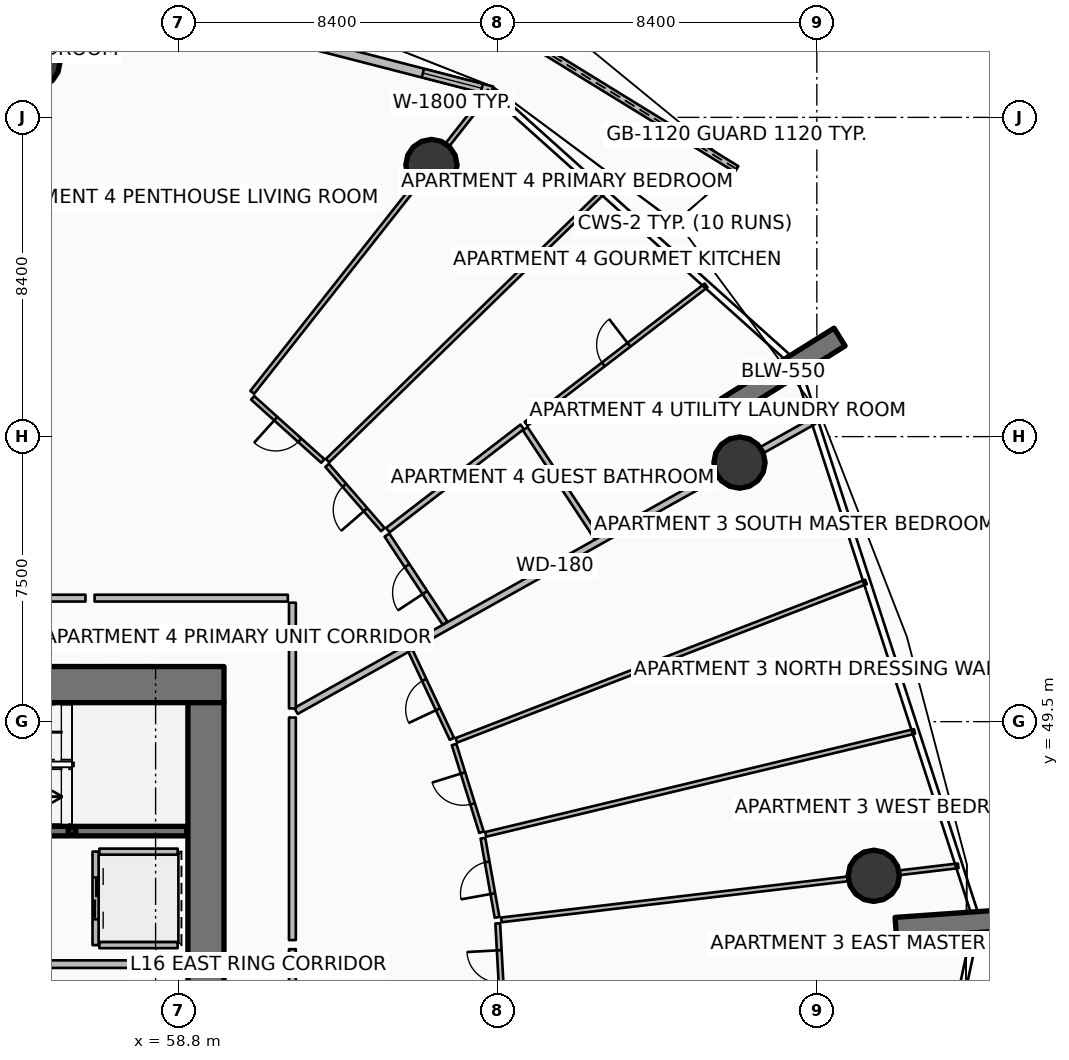
"""IFC4 building model, lengths in metres.
Left out: names, types, materials, properties, quantities, classifications, styles, units other than length and angle.
Written with IfcOpenShell. Run it as: python <this file> out.ifc"""

import sys

from ifc_helpers import new_model, si_unit, direction, frame, frame_2d, origin, origin_2d, place, context, subcontext, project, spatial, polyline, rectangle, hollow_rectangle, circle, outline, extrude, element, fill, save


model = new_model("IFC4")
c1 = context("Model", 3, precision=1e-05, world=origin(), true_north=direction((0.0, 1.0)))
c2 = subcontext(c1, "Body", "Model", "MODEL_VIEW")
j1 = project(units=[si_unit("LENGTHUNIT", "METRE"), si_unit("PLANEANGLEUNIT", "RADIAN")], contexts=[c1])
p1 = place(None, origin())
s1 = spatial("IfcSite", under=j1, at=p1, CompositionType="ELEMENT")
p2 = place(p1, origin())
s2 = spatial("IfcBuilding", under=s1, at=p2, CompositionType="ELEMENT")
p3 = place(p2, frame((0.0, 0.0, 67.65)))
s3 = spatial("IfcBuildingStorey", under=s2, at=p3, CompositionType="ELEMENT", Elevation=67.65)
p4 = place(p3, frame((49.95, 50.475, 0.0), z_axis=(0.0, 0.0, 1.0), x_axis=(1.0, 0.0, 0.0)))
e1 = element("IfcWall", 1, at=p4, inside=s3, PredefinedType="SHEAR", context=c2, shape_type="SweptSolid", body=[
    extrude(rectangle(XDim=10.05, YDim=0.95, at=frame_2d((5.025, 0.0))), origin(), (0.0, 0.0, 1.0), 3.75),
])
p5 = place(p3, frame((59.525, 34.0, 0.0), z_axis=(0.0, 0.0, 1.0), x_axis=(0.0, 1.0, 0.0)))
e2 = element("IfcWall", 2, at=p5, inside=s3, PredefinedType="SHEAR", context=c2, shape_type="SweptSolid", body=[
    extrude(rectangle(XDim=16.0, YDim=0.95, at=frame_2d((8.0, 0.0))), origin(), (0.0, 0.0, 1.0), 3.75),
])
p6 = place(p3, frame((56.0, 46.62, 0.0), z_axis=(0.0, 0.0, 1.0), x_axis=(1.0, 0.0, 0.0)))
e3 = element("IfcColumn", 3, at=p6, inside=s3, PredefinedType="COLUMN", context=c2, shape_type="SweptSolid", body=[
    extrude(hollow_rectangle(XDim=0.2, YDim=0.2, WallThickness=0.01, InnerFilletRadius=0.01, OuterFilletRadius=0.02, at=origin_2d()), origin(), (0.0, 0.0, 1.0), 1.67),
])
for number, where, z_axis, x_axis in (
    (4, (73.23, 57.765, 0.0), (0.0, 0.0, 1.0), (0.848, 0.53, 0.0)),
    (5, (77.678, 44.075, 0.0), (0.0, 0.0, 1.0), (0.998, 0.07, 0.0)),
):
    element("IfcWall", number, at=place(p3, frame(where, z_axis=z_axis, x_axis=x_axis)), inside=s3, PredefinedType="SOLIDWALL", context=c2, shape_type="SweptSolid", body=[
        extrude(rectangle(XDim=3.5, YDim=0.55, at=frame_2d((1.75, 0.0))), origin(), (0.0, 0.0, 1.0), 3.75),
    ])
for number, where, z_axis, x_axis in (
    (6, (73.565, 56.317, 0.0), (0.0, 0.0, 1.0), (1.0, 0.0, 0.0)),
    (7, (65.458, 64.146, 0.0), (0.0, 0.0, 1.0), (1.0, 0.0, 0.0)),
    (8, (55.008, 66.849, 0.0), (0.0, 0.0, 1.0), (1.0, 0.0, 0.0)),
    (9, (77.098, 45.444, 0.0), (0.0, 0.0, 1.0), (1.0, 0.0, 0.0)),
):
    element("IfcColumn", number, at=place(p3, frame(where, z_axis=z_axis, x_axis=x_axis)), inside=s3, PredefinedType="COLUMN", context=c2, shape_type="SweptSolid", body=[
        extrude(circle(Radius=0.675, at=origin_2d()), origin(), (0.0, 0.0, 1.0), 3.35),
    ])
p7 = place(p3, frame((73.488, 64.039, 0.0), z_axis=(0.0, 0.0, 1.0), x_axis=(-0.851732671453, 0.523976579991, 0.0)))
e10 = element("IfcWall", 10, at=p7, inside=s3, PredefinedType="PARAPET", context=c2, shape_type="SweptSolid", body=[
    extrude(outline(polyline([(0.0, 0.0), (12.625, 0.0), (12.625, 1.832), (6.312, 1.696), (0.0, 1.497), (0.0, 0.0)])), frame((0.0, 0.09, 0.0), z_axis=(0.0, -1.0, 0.0), x_axis=(1.0, 0.0, 0.0)), (0.0, 0.0, 1.0), 0.18),
])
p8 = place(p3, frame((67.054, 66.096, 0.0), z_axis=(0.0, 0.0, 1.0), x_axis=(-0.96833871487, 0.249640007378, 0.0)))
e11 = element("IfcWall", 11, at=p8, inside=s3, PredefinedType="SOLIDWALL", context=c2, shape_type="SweptSolid", body=[
    extrude(rectangle(XDim=11.851, YDim=0.24, at=frame_2d((5.926, 0.0))), origin(), (0.0, 0.0, 1.0), 2.3),
])
p9 = place(p8, frame((9.631, 0.0, 0.0)))
e12 = element("IfcOpeningElement", 12, at=p9, cuts=e11, PredefinedType="OPENING", context=c2, shape_type="SweptSolid", body=[
    extrude(rectangle(XDim=1.45, YDim=2.15, at=frame_2d((0.725, 1.075))), frame((0.0, 0.13, 0.0), z_axis=(0.0, -1.0, 0.0), x_axis=(1.0, 0.0, 0.0)), (0.0, 0.0, 1.0), 0.26),
])
p10 = place(p8, frame((0.28, 0.0, 0.65)))
e13 = element("IfcOpeningElement", 13, at=p10, cuts=e11, PredefinedType="OPENING", context=c2, shape_type="SweptSolid", body=[
    extrude(rectangle(XDim=1.6, YDim=1.5, at=frame_2d((0.8, 0.75))), frame((0.0, 0.13, 0.0), z_axis=(0.0, -1.0, 0.0), x_axis=(1.0, 0.0, 0.0)), (0.0, 0.0, 1.0), 0.26),
])
p11 = place(p3, frame((51.48, 46.62, 0.0), z_axis=(0.0, 0.0, 1.0), x_axis=(1.0, 0.0, 0.0)))
e14 = element("IfcWall", 14, at=p11, inside=s3, PredefinedType="SOLIDWALL", context=c2, shape_type="SweptSolid", body=[
    extrude(rectangle(XDim=7.54, YDim=0.25, at=frame_2d((3.77, 0.0))), origin(), (0.0, 0.0, 1.0), 3.35),
])
p12 = place(p11, frame((0.3, 0.0, 0.0)))
e15 = element("IfcOpeningElement", 15, at=p12, cuts=e14, PredefinedType="OPENING", context=c2, shape_type="SweptSolid", body=[
    extrude(rectangle(XDim=1.55, YDim=2.15, at=frame_2d((0.775, 1.075))), frame((0.0, 0.135, 0.0), z_axis=(0.0, -1.0, 0.0), x_axis=(1.0, 0.0, 0.0)), (0.0, 0.0, 1.0), 0.27),
])
p13 = place(p3, frame((56.62, 46.08, 0.0), z_axis=(0.0, 0.0, 1.0), x_axis=(0.0, -1.0, 0.0)))
e16 = element("IfcWall", 16, at=p13, inside=s3, PredefinedType="PARTITIONING", context=c2, shape_type="SweptSolid", body=[
    extrude(rectangle(XDim=2.46, YDim=0.16, at=frame_2d((1.23, 0.0))), origin(), (0.0, 0.0, 1.0), 3.35),
])
p14 = place(p13, frame((0.68, 0.0, 0.0)))
e17 = element("IfcOpeningElement", 17, at=p14, cuts=e16, PredefinedType="OPENING", context=c2, shape_type="SweptSolid", body=[
    extrude(rectangle(XDim=1.1, YDim=2.1, at=frame_2d((0.55, 1.05))), frame((0.0, 0.09, 0.0), z_axis=(0.0, -1.0, 0.0), x_axis=(1.0, 0.0, 0.0)), (0.0, 0.0, 1.0), 0.18),
])
for number, where, z_axis, x_axis in (
    (18, (56.72, 46.08, 0.0), (0.0, 0.0, 1.0), (1.0, 0.0, 0.0)),
    (19, (56.72, 43.62, 0.0), (0.0, 0.0, 1.0), (1.0, 0.0, 0.0)),
):
    element("IfcWall", number, at=place(p3, frame(where, z_axis=z_axis, x_axis=x_axis)), inside=s3, PredefinedType="PARTITIONING", context=c2, shape_type="SweptSolid", body=[
        extrude(rectangle(XDim=2.06, YDim=0.16, at=frame_2d((1.03, 0.0))), origin(), (0.0, 0.0, 1.0), 3.35),
    ])
p15 = place(p3, frame((50.12, 43.12, 0.0), z_axis=(0.0, 0.0, 1.0), x_axis=(1.0, 0.0, 0.0)))
e20 = element("IfcWall", 20, at=p15, inside=s3, PredefinedType="PARTITIONING", context=c2, shape_type="SweptSolid", body=[
    extrude(rectangle(XDim=8.88, YDim=0.2, at=frame_2d((4.44, 0.0))), origin(), (0.0, 0.0, 1.0), 3.35),
])
p16 = place(p3, frame((61.896, 49.782, 0.0), z_axis=(0.0, 0.0, 1.0), x_axis=(0.872493215695, 0.488626225828, 0.0)))
e21 = element("IfcWall", 21, at=p16, inside=s3, PredefinedType="PARTITIONING", context=c2, shape_type="SweptSolid", body=[
    extrude(rectangle(XDim=15.612, YDim=0.18, at=frame_2d((7.806, 0.0))), origin(), (0.0, 0.0, 1.0), 2.717),
])
p17 = place(p3, frame((61.8, 38.228, 0.0), z_axis=(0.0, 0.0, 1.0), x_axis=(0.0, 1.0, 0.0)))
e22 = element("IfcWall", 22, at=p17, inside=s3, PredefinedType="PARTITIONING", context=c2, shape_type="SweptSolid", body=[
    extrude(rectangle(XDim=5.285, YDim=0.18, at=frame_2d((2.643, 0.0))), origin(), (0.0, 0.0, 1.0), 2.717),
])
p18 = place(p3, frame((67.328, 41.928, 0.0), z_axis=(0.0, 0.0, 1.0), x_axis=(-0.054903584575, 0.998491660657, 0.0)))
e23 = element("IfcWall", 23, at=p18, inside=s3, PredefinedType="PARTITIONING", context=c2, shape_type="SweptSolid", body=[
    extrude(rectangle(XDim=2.268, YDim=0.125, at=frame_2d((1.134, 0.0))), origin(), (0.0, 0.0, 1.0), 2.717),
])
p19 = place(p18, frame((0.709, 0.0, 0.0)))
e24 = element("IfcOpeningElement", 24, at=p19, cuts=e23, PredefinedType="OPENING", context=c2, shape_type="SweptSolid", body=[
    extrude(rectangle(XDim=0.85, YDim=2.06, at=frame_2d((0.425, 1.03))), frame((0.0, 0.073, 0.0), z_axis=(0.0, -1.0, 0.0), x_axis=(1.0, 0.0, 0.0)), (0.0, 0.0, 1.0), 0.145),
])
p20 = place(p3, frame((61.8, 43.753, 0.0), z_axis=(0.0, 0.0, 1.0), x_axis=(0.0, 1.0, 0.0)))
e25 = element("IfcWall", 25, at=p20, inside=s3, PredefinedType="PARTITIONING", context=c2, shape_type="SweptSolid", body=[
    extrude(rectangle(XDim=5.855, YDim=0.18, at=frame_2d((2.927, 0.0))), origin(), (0.0, 0.0, 1.0), 2.717),
])
p21 = place(p3, frame((67.298, 44.284, 0.0), z_axis=(0.0, 0.0, 1.0), x_axis=(0.993068589749, 0.117536275483, 0.0)))
e26 = element("IfcWall", 26, at=p21, inside=s3, PredefinedType="PARTITIONING", context=c2, shape_type="SweptSolid", body=[
    extrude(rectangle(XDim=12.106, YDim=0.125, at=frame_2d((6.053, 0.0))), origin(), (0.0, 0.0, 1.0), 2.717),
])
p22 = place(p3, frame((66.886, 46.534, 0.0), z_axis=(0.0, 0.0, 1.0), x_axis=(0.972368393799, 0.233451722507, 0.0)))
e27 = element("IfcWall", 27, at=p22, inside=s3, PredefinedType="PARTITIONING", context=c2, shape_type="SweptSolid", body=[
    extrude(rectangle(XDim=11.605, YDim=0.125, at=frame_2d((5.802, 0.0))), origin(), (0.0, 0.0, 1.0), 2.79),
])
p23 = place(p3, frame((66.115, 49.008, 0.0), z_axis=(0.0, 0.0, 1.0), x_axis=(0.932641955578, 0.360803246514, 0.0)))
e28 = element("IfcWall", 28, at=p23, inside=s3, PredefinedType="PARTITIONING", context=c2, shape_type="SweptSolid", body=[
    extrude(rectangle(XDim=11.556, YDim=0.125, at=frame_2d((5.778, 0.0))), origin(), (0.0, 0.0, 1.0), 2.79),
])
p24 = place(p3, frame((67.185, 44.351, 0.0), z_axis=(0.0, 0.0, 1.0), x_axis=(-0.175726743029, 0.984438983271, 0.0)))
e29 = element("IfcWall", 29, at=p24, inside=s3, PredefinedType="PARTITIONING", context=c2, shape_type="SweptSolid", body=[
    extrude(rectangle(XDim=2.116, YDim=0.125, at=frame_2d((1.058, 0.0))), origin(), (0.0, 0.0, 1.0), 2.717),
])
p25 = place(p24, frame((0.633, 0.0, 0.0)))
e30 = element("IfcOpeningElement", 30, at=p25, cuts=e29, PredefinedType="OPENING", context=c2, shape_type="SweptSolid", body=[
    extrude(rectangle(XDim=0.85, YDim=2.06, at=frame_2d((0.425, 1.03))), frame((0.0, 0.073, 0.0), z_axis=(0.0, -1.0, 0.0), x_axis=(1.0, 0.0, 0.0)), (0.0, 0.0, 1.0), 0.145),
])
p26 = place(p3, frame((66.775, 46.59, 0.0), z_axis=(0.0, 0.0, 1.0), x_axis=(-0.297792299564, 0.954630685826, 0.0)))
e31 = element("IfcWall", 31, at=p26, inside=s3, PredefinedType="PARTITIONING", context=c2, shape_type="SweptSolid", body=[
    extrude(rectangle(XDim=2.419, YDim=0.125, at=frame_2d((1.21, 0.0))), origin(), (0.0, 0.0, 1.0), 2.79),
])
p27 = place(p26, frame((0.785, 0.0, 0.0)))
e32 = element("IfcOpeningElement", 32, at=p27, cuts=e31, PredefinedType="OPENING", context=c2, shape_type="SweptSolid", body=[
    extrude(rectangle(XDim=0.85, YDim=2.06, at=frame_2d((0.425, 1.03))), frame((0.0, 0.073, 0.0), z_axis=(0.0, -1.0, 0.0), x_axis=(1.0, 0.0, 0.0)), (0.0, 0.0, 1.0), 0.145),
])
p28 = place(p3, frame((65.997, 49.048, 0.0), z_axis=(0.0, 0.0, 1.0), x_axis=(-0.425774166793, 0.904829463983, 0.0)))
e33 = element("IfcWall", 33, at=p28, inside=s3, PredefinedType="PARTITIONING", context=c2, shape_type="SweptSolid", body=[
    extrude(rectangle(XDim=2.571, YDim=0.125, at=frame_2d((1.285, 0.0))), origin(), (0.0, 0.0, 1.0), 2.717),
])
p29 = place(p28, frame((0.86, 0.0, 0.0)))
e34 = element("IfcOpeningElement", 34, at=p29, cuts=e33, PredefinedType="OPENING", context=c2, shape_type="SweptSolid", body=[
    extrude(rectangle(XDim=0.85, YDim=2.06, at=frame_2d((0.425, 1.03))), frame((0.0, 0.073, 0.0), z_axis=(0.0, -1.0, 0.0), x_axis=(1.0, 0.0, 0.0)), (0.0, 0.0, 1.0), 0.145),
])
p30 = place(p3, frame((56.354, 52.75, 0.0), z_axis=(0.0, 0.0, 1.0), x_axis=(-1.0, 0.0, 0.0)))
e35 = element("IfcWall", 35, at=p30, inside=s3, PredefinedType="PARTITIONING", context=c2, shape_type="SweptSolid", body=[
    extrude(rectangle(XDim=5.203, YDim=0.18, at=frame_2d((2.601, 0.0))), origin(), (0.0, 0.0, 1.0), 2.717),
])
p31 = place(p30, frame((2.052, 0.0, 0.0)))
e36 = element("IfcOpeningElement", 36, at=p31, cuts=e35, PredefinedType="OPENING", context=c2, shape_type="SweptSolid", body=[
    extrude(rectangle(XDim=1.1, YDim=2.1, at=frame_2d((0.55, 1.05))), frame((0.0, 0.1, 0.0), z_axis=(0.0, -1.0, 0.0), x_axis=(1.0, 0.0, 0.0)), (0.0, 0.0, 1.0), 0.2),
])
p32 = place(p3, frame((61.8, 49.848, 0.0), z_axis=(0.0, 0.0, 1.0), x_axis=(0.0, 1.0, 0.0)))
e37 = element("IfcWall", 37, at=p32, inside=s3, PredefinedType="PARTITIONING", context=c2, shape_type="SweptSolid", body=[
    extrude(rectangle(XDim=2.781, YDim=0.18, at=frame_2d((1.391, 0.0))), origin(), (0.0, 0.0, 1.0), 2.717),
])
p33 = place(p3, frame((61.68, 52.75, 0.0), z_axis=(0.0, 0.0, 1.0), x_axis=(-1.0, 0.0, 0.0)))
e38 = element("IfcWall", 38, at=p33, inside=s3, PredefinedType="PARTITIONING", context=c2, shape_type="SweptSolid", body=[
    extrude(rectangle(XDim=5.085, YDim=0.18, at=frame_2d((2.543, 0.0))), origin(), (0.0, 0.0, 1.0), 2.717),
])
p34 = place(p3, frame((60.743, 58.164, 0.0), z_axis=(0.0, 0.0, 1.0), x_axis=(0.61907620874, 0.785330916093, 0.0)))
e39 = element("IfcWall", 39, at=p34, inside=s3, PredefinedType="PARTITIONING", context=c2, shape_type="SweptSolid", body=[
    extrude(rectangle(XDim=10.091, YDim=0.125, at=frame_2d((5.046, 0.0))), origin(), (0.0, 0.0, 1.0), 2.717),
])
p35 = place(p3, frame((65.816, 52.092, 0.0), z_axis=(0.0, 0.0, 1.0), x_axis=(-0.550532146696, 0.834813964578, 0.0)))
e40 = element("IfcWall", 40, at=p35, inside=s3, PredefinedType="PARTITIONING", context=c2, shape_type="SweptSolid", body=[
    extrude(rectangle(XDim=2.776, YDim=0.15, at=frame_2d((1.388, 0.0))), origin(), (0.0, 0.0, 1.0), 2.717),
])
p36 = place(p35, frame((0.963, 0.0, 0.0)))
e41 = element("IfcOpeningElement", 41, at=p36, cuts=e40, PredefinedType="OPENING", context=c2, shape_type="SweptSolid", body=[
    extrude(rectangle(XDim=0.85, YDim=2.06, at=frame_2d((0.425, 1.03))), frame((0.0, 0.085, 0.0), z_axis=(0.0, -1.0, 0.0), x_axis=(1.0, 0.0, 0.0)), (0.0, 0.0, 1.0), 0.17),
])
p37 = place(p3, frame((69.821, 54.335, 0.0), z_axis=(0.0, 0.0, 1.0), x_axis=(-0.550516877558, 0.834824033868, 0.0)))
e42 = element("IfcWall", 42, at=p37, inside=s3, PredefinedType="PARTITIONING", context=c2, shape_type="SweptSolid", body=[
    extrude(rectangle(XDim=3.44, YDim=0.15, at=frame_2d((1.72, 0.0))), origin(), (0.0, 0.0, 1.0), 2.717),
])
p38 = place(p3, frame((64.31, 54.539, 0.0), z_axis=(0.0, 0.0, 1.0), x_axis=(0.792803030826, 0.609477935871, 0.0)))
e43 = element("IfcWall", 43, at=p38, inside=s3, PredefinedType="PARTITIONING", context=c2, shape_type="SweptSolid", body=[
    extrude(rectangle(XDim=4.46, YDim=0.15, at=frame_2d((2.23, 0.0))), origin(), (0.0, 0.0, 1.0), 2.79),
])
p39 = place(p3, frame((67.949, 57.337, 0.0), z_axis=(0.0, 0.0, 1.0), x_axis=(0.792800135679, 0.609481701832, 0.0)))
e44 = element("IfcWall", 44, at=p39, inside=s3, PredefinedType="PARTITIONING", context=c2, shape_type="SweptSolid", body=[
    extrude(rectangle(XDim=5.976, YDim=0.125, at=frame_2d((2.988, 0.0))), origin(), (0.0, 0.0, 1.0), 2.79),
])
p40 = place(p39, frame((2.563, 0.0, 0.0)))
e45 = element("IfcOpeningElement", 45, at=p40, cuts=e44, PredefinedType="OPENING", context=c2, shape_type="SweptSolid", body=[
    extrude(rectangle(XDim=0.85, YDim=2.06, at=frame_2d((0.425, 1.03))), frame((0.0, 0.073, 0.0), z_axis=(0.0, -1.0, 0.0), x_axis=(1.0, 0.0, 0.0)), (0.0, 0.0, 1.0), 0.145),
])
p41 = place(p3, frame((62.725, 56.368, 0.0), z_axis=(0.0, 0.0, 1.0), x_axis=(0.715749552764, 0.698357056038, 0.0)))
e46 = element("IfcWall", 46, at=p41, inside=s3, PredefinedType="PARTITIONING", context=c2, shape_type="SweptSolid", body=[
    extrude(rectangle(XDim=10.107, YDim=0.125, at=frame_2d((5.053, 0.0))), origin(), (0.0, 0.0, 1.0), 2.79),
])
p42 = place(p3, frame((64.18, 54.552, 0.0), z_axis=(0.0, 0.0, 1.0), x_axis=(-0.654947139149, 0.75567469517, 0.0)))
e47 = element("IfcWall", 47, at=p42, inside=s3, PredefinedType="PARTITIONING", context=c2, shape_type="SweptSolid", body=[
    extrude(rectangle(XDim=2.24, YDim=0.125, at=frame_2d((1.12, 0.0))), origin(), (0.0, 0.0, 1.0), 2.79),
])
p43 = place(p42, frame((0.695, 0.0, 0.0)))
e48 = element("IfcOpeningElement", 48, at=p43, cuts=e47, PredefinedType="OPENING", context=c2, shape_type="SweptSolid", body=[
    extrude(rectangle(XDim=0.85, YDim=2.06, at=frame_2d((0.425, 1.03))), frame((0.0, 0.073, 0.0), z_axis=(0.0, -1.0, 0.0), x_axis=(1.0, 0.0, 0.0)), (0.0, 0.0, 1.0), 0.145),
])
p44 = place(p3, frame((62.601, 56.358, 0.0), z_axis=(0.0, 0.0, 1.0), x_axis=(-0.743435913228, 0.66880717918, 0.0)))
e49 = element("IfcWall", 49, at=p44, inside=s3, PredefinedType="PARTITIONING", context=c2, shape_type="SweptSolid", body=[
    extrude(rectangle(XDim=2.483, YDim=0.125, at=frame_2d((1.241, 0.0))), origin(), (0.0, 0.0, 1.0), 2.717),
])
p45 = place(p44, frame((0.816, 0.0, 0.0)))
e50 = element("IfcOpeningElement", 50, at=p45, cuts=e49, PredefinedType="OPENING", context=c2, shape_type="SweptSolid", body=[
    extrude(rectangle(XDim=0.85, YDim=2.06, at=frame_2d((0.425, 1.03))), frame((0.0, 0.073, 0.0), z_axis=(0.0, -1.0, 0.0), x_axis=(1.0, 0.0, 0.0)), (0.0, 0.0, 1.0), 0.145),
])
p46 = place(p3, frame((53.587, 61.81, 0.0), z_axis=(0.0, 0.0, 1.0), x_axis=(0.271464088879, 0.962448569249, 0.0)))
e51 = element("IfcWall", 51, at=p46, inside=s3, PredefinedType="PARTITIONING", context=c2, shape_type="SweptSolid", body=[
    extrude(rectangle(XDim=7.389, YDim=0.125, at=frame_2d((3.695, 0.0))), origin(), (0.0, 0.0, 1.0), 2.717),
])
p47 = place(p10, origin())
e52 = element("IfcWindow", 52, at=p47, inside=s3, PartitioningType="SINGLE_PANEL", PredefinedType="WINDOW", context=c2, shape_type="SweptSolid", body=[
    extrude(rectangle(XDim=1.6, YDim=1.5, at=frame_2d((0.8, 0.75))), frame((0.0, 0.03, 0.0), z_axis=(0.0, -1.0, 0.0), x_axis=(1.0, 0.0, 0.0)), (0.0, 0.0, 1.0), 0.06),
])
fill(e13, e52)
p48 = place(p14, origin())
e53 = element("IfcDoor", 53, at=p48, inside=s3, OperationType="DOUBLE_DOOR_SLIDING", PredefinedType="DOOR", context=c2, shape_type="SweptSolid", body=[
    extrude(rectangle(XDim=1.1, YDim=2.1, at=frame_2d((0.55, 1.05))), frame((0.0, 0.025, 0.0), z_axis=(0.0, -1.0, 0.0), x_axis=(1.0, 0.0, 0.0)), (0.0, 0.0, 1.0), 0.05),
])
fill(e17, e53)
p49 = place(p19, origin())
e54 = element("IfcDoor", 54, at=p49, inside=s3, OperationType="SINGLE_SWING_RIGHT", PredefinedType="DOOR", context=c2, shape_type="SweptSolid", body=[
    extrude(rectangle(XDim=0.85, YDim=2.06, at=frame_2d((0.425, 1.03))), frame((0.0, 0.025, 0.0), z_axis=(0.0, -1.0, 0.0), x_axis=(1.0, 0.0, 0.0)), (0.0, 0.0, 1.0), 0.05),
])
fill(e24, e54)
p50 = place(p25, origin())
e55 = element("IfcDoor", 55, at=p50, inside=s3, OperationType="SINGLE_SWING_LEFT", PredefinedType="DOOR", context=c2, shape_type="SweptSolid", body=[
    extrude(rectangle(XDim=0.85, YDim=2.06, at=frame_2d((0.425, 1.03))), frame((0.0, 0.025, 0.0), z_axis=(0.0, -1.0, 0.0), x_axis=(1.0, 0.0, 0.0)), (0.0, 0.0, 1.0), 0.05),
])
fill(e30, e55)
p51 = place(p27, origin())
e56 = element("IfcDoor", 56, at=p51, inside=s3, OperationType="SINGLE_SWING_RIGHT", PredefinedType="DOOR", context=c2, shape_type="SweptSolid", body=[
    extrude(rectangle(XDim=0.85, YDim=2.06, at=frame_2d((0.425, 1.03))), frame((0.0, 0.025, 0.0), z_axis=(0.0, -1.0, 0.0), x_axis=(1.0, 0.0, 0.0)), (0.0, 0.0, 1.0), 0.05),
])
fill(e32, e56)
p52 = place(p29, origin())
e57 = element("IfcDoor", 57, at=p52, inside=s3, OperationType="SINGLE_SWING_LEFT", PredefinedType="DOOR", context=c2, shape_type="SweptSolid", body=[
    extrude(rectangle(XDim=0.85, YDim=2.06, at=frame_2d((0.425, 1.03))), frame((0.0, 0.025, 0.0), z_axis=(0.0, -1.0, 0.0), x_axis=(1.0, 0.0, 0.0)), (0.0, 0.0, 1.0), 0.05),
])
fill(e34, e57)
p53 = place(p36, origin())
e58 = element("IfcDoor", 58, at=p53, inside=s3, OperationType="SINGLE_SWING_LEFT", PredefinedType="DOOR", context=c2, shape_type="SweptSolid", body=[
    extrude(rectangle(XDim=0.85, YDim=2.06, at=frame_2d((0.425, 1.03))), frame((0.0, 0.025, 0.0), z_axis=(0.0, -1.0, 0.0), x_axis=(1.0, 0.0, 0.0)), (0.0, 0.0, 1.0), 0.05),
])
fill(e41, e58)
p54 = place(p40, origin())
e59 = element("IfcDoor", 59, at=p54, inside=s3, OperationType="SINGLE_SWING_RIGHT", PredefinedType="DOOR", context=c2, shape_type="SweptSolid", body=[
    extrude(rectangle(XDim=0.85, YDim=2.06, at=frame_2d((0.425, 1.03))), frame((0.0, 0.025, 0.0), z_axis=(0.0, -1.0, 0.0), x_axis=(1.0, 0.0, 0.0)), (0.0, 0.0, 1.0), 0.05),
])
fill(e45, e59)
p55 = place(p43, origin())
e60 = element("IfcDoor", 60, at=p55, inside=s3, OperationType="SINGLE_SWING_LEFT", PredefinedType="DOOR", context=c2, shape_type="SweptSolid", body=[
    extrude(rectangle(XDim=0.85, YDim=2.06, at=frame_2d((0.425, 1.03))), frame((0.0, 0.025, 0.0), z_axis=(0.0, -1.0, 0.0), x_axis=(1.0, 0.0, 0.0)), (0.0, 0.0, 1.0), 0.05),
])
fill(e48, e60)
p56 = place(p45, origin())
e61 = element("IfcDoor", 61, at=p56, inside=s3, OperationType="SINGLE_SWING_RIGHT", PredefinedType="DOOR", context=c2, shape_type="SweptSolid", body=[
    extrude(rectangle(XDim=0.85, YDim=2.06, at=frame_2d((0.425, 1.03))), frame((0.0, 0.025, 0.0), z_axis=(0.0, -1.0, 0.0), x_axis=(1.0, 0.0, 0.0)), (0.0, 0.0, 1.0), 0.05),
])
fill(e50, e61)
save(model, sys.argv[1])
